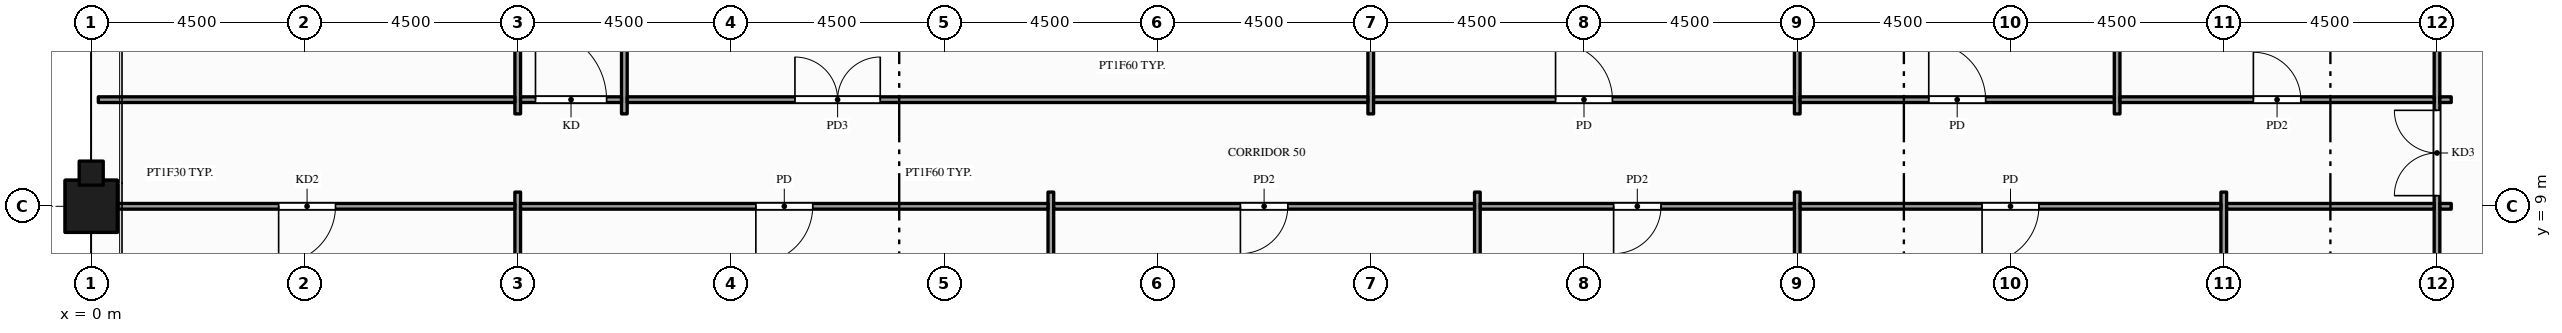
"""IFC4 building model, lengths in metres.
Left out: names, types, materials, properties, quantities, classifications, styles, units other than length and angle.
Written with IfcOpenShell. Run it as: python <this file> out.ifc"""

import sys

from ifc_helpers import new_model, si_unit, direction, frame, frame_2d, origin, origin_2d, place, context, subcontext, project, spatial, rectangle, hollow_rectangle, extrude, element, fill, save


model = new_model("IFC4")
c1 = context("Model", 3, precision=1e-05, world=origin(), true_north=direction((0.0, 1.0)))
c2 = subcontext(c1, "Body", "Model", "MODEL_VIEW")
j1 = project(units=[si_unit("LENGTHUNIT", "METRE"), si_unit("PLANEANGLEUNIT", "RADIAN")], contexts=[c1])
p1 = place(None, origin())
s1 = spatial("IfcSite", under=j1, at=p1, CompositionType="ELEMENT")
p2 = place(p1, origin())
s2 = spatial("IfcBuilding", under=s1, at=p2, CompositionType="ELEMENT")
p3 = place(p2, frame((0.0, 0.0, 77.0)))
s3 = spatial("IfcBuildingStorey", under=s2, at=p3, CompositionType="ELEMENT", Elevation=77.0)
p4 = place(p3, frame((0.0, 9.0, -0.25), z_axis=(0.0, 0.0, 1.0), x_axis=(1.0, 0.0, 0.0)))
e1 = element("IfcColumn", 1, at=p4, inside=s3, PredefinedType="COLUMN", context=c2, shape_type="SweptSolid", body=[
    extrude(hollow_rectangle(XDim=1.1, YDim=1.1, WallThickness=0.06, at=origin_2d()), origin(), (0.0, 0.0, 1.0), 4.6),
])
p5 = place(p3, frame((0.0, 9.0, 4.35), z_axis=(0.0, 0.0, 1.0), x_axis=(1.0, 0.0, 0.0)))
e2 = element("IfcColumn", 2, at=p5, inside=s3, PredefinedType="COLUMN", context=c2, shape_type="SweptSolid", body=[
    extrude(rectangle(XDim=1.1, YDim=1.1, at=origin_2d()), origin(), (0.0, 0.0, 1.0), 1.5),
])
p6 = place(p3, frame((9.0, 3.875, 0.0), z_axis=(0.0, 0.0, 1.0), x_axis=(0.0, 1.0, 0.0)))
e3 = element("IfcWall", 3, at=p6, inside=s3, PredefinedType="PARTITIONING", context=c2, shape_type="SweptSolid", body=[
    extrude(rectangle(XDim=5.425, YDim=0.12, at=frame_2d((2.712, 0.0))), origin(), (0.0, 0.0, 1.0), 4.938),
])
p7 = place(p3, frame((9.0, 10.95, 0.0), z_axis=(0.0, 0.0, 1.0), x_axis=(0.0, 1.0, 0.0)))
e4 = element("IfcWall", 4, at=p7, inside=s3, PredefinedType="PARTITIONING", context=c2, shape_type="SweptSolid", body=[
    extrude(rectangle(XDim=20.85, YDim=0.12, at=frame_2d((10.425, 0.0))), origin(), (0.0, 0.0, 1.0), 4.6),
])
p8 = place(p7, frame((2.05, 0.0, 0.0)))
e5 = element("IfcOpeningElement", 5, at=p8, cuts=e4, PredefinedType="OPENING", context=c2, shape_type="SweptSolid", body=[
    extrude(rectangle(XDim=1.0, YDim=2.1, at=frame_2d((0.5, 1.05))), frame((0.0, 0.07, 0.0), z_axis=(0.0, -1.0, 0.0), x_axis=(1.0, 0.0, 0.0)), (0.0, 0.0, 1.0), 0.14),
])
p9 = place(p7, frame((6.45, 0.0, 0.0)))
e6 = element("IfcOpeningElement", 6, at=p9, cuts=e4, PredefinedType="OPENING", context=c2, shape_type="SweptSolid", body=[
    extrude(rectangle(XDim=1.2, YDim=2.1, at=frame_2d((0.6, 1.05))), frame((0.0, 0.07, 0.0), z_axis=(0.0, -1.0, 0.0), x_axis=(1.0, 0.0, 0.0)), (0.0, 0.0, 1.0), 0.14),
])
p10 = place(p7, frame((12.175, 0.0, 0.0)))
e7 = element("IfcOpeningElement", 7, at=p10, cuts=e4, PredefinedType="OPENING", context=c2, shape_type="SweptSolid", body=[
    extrude(rectangle(XDim=1.0, YDim=2.1, at=frame_2d((0.5, 1.05))), frame((0.0, 0.07, 0.0), z_axis=(0.0, -1.0, 0.0), x_axis=(1.0, 0.0, 0.0)), (0.0, 0.0, 1.0), 0.14),
])
p11 = place(p3, frame((11.25, 10.95, 0.0), z_axis=(0.0, 0.0, 1.0), x_axis=(0.0, 1.0, 0.0)))
e8 = element("IfcWall", 8, at=p11, inside=s3, PredefinedType="PARTITIONING", context=c2, shape_type="SweptSolid", body=[
    extrude(rectangle(XDim=20.85, YDim=0.12, at=frame_2d((10.425, 0.0))), origin(), (0.0, 0.0, 1.0), 4.6),
])
p12 = place(p11, frame((17.8, 0.0, 0.0)))
e9 = element("IfcOpeningElement", 9, at=p12, cuts=e8, PredefinedType="OPENING", context=c2, shape_type="SweptSolid", body=[
    extrude(rectangle(XDim=1.0, YDim=2.1, at=frame_2d((0.5, 1.05))), frame((0.0, 0.07, 0.0), z_axis=(0.0, -1.0, 0.0), x_axis=(1.0, 0.0, 0.0)), (0.0, 0.0, 1.0), 0.14),
])
p13 = place(p11, frame((4.2, 0.0, 0.0)))
e10 = element("IfcOpeningElement", 10, at=p13, cuts=e8, PredefinedType="OPENING", context=c2, shape_type="SweptSolid", body=[
    extrude(rectangle(XDim=1.2, YDim=2.1, at=frame_2d((0.6, 1.05))), frame((0.0, 0.07, 0.0), z_axis=(0.0, -1.0, 0.0), x_axis=(1.0, 0.0, 0.0)), (0.0, 0.0, 1.0), 0.14),
])
p14 = place(p3, frame((20.25, 0.15, 0.0), z_axis=(0.0, 0.0, 1.0), x_axis=(0.0, 1.0, 0.0)))
e11 = element("IfcWall", 11, at=p14, inside=s3, PredefinedType="PARTITIONING", context=c2, shape_type="SweptSolid", body=[
    extrude(rectangle(XDim=9.15, YDim=0.12, at=frame_2d((4.575, 0.0))), origin(), (0.0, 0.0, 1.0), 4.938),
])
p15 = place(p3, frame((27.0, 10.95, 0.0), z_axis=(0.0, 0.0, 1.0), x_axis=(0.0, 1.0, 0.0)))
e12 = element("IfcWall", 12, at=p15, inside=s3, PredefinedType="PARTITIONING", context=c2, shape_type="SweptSolid", body=[
    extrude(rectangle(XDim=11.4, YDim=0.12, at=frame_2d((5.7, 0.0))), origin(), (0.0, 0.0, 1.0), 4.938),
])
for number, where, z_axis, x_axis in (
    (13, (29.25, 0.15, 0.0), (0.0, 0.0, 1.0), (0.0, 1.0, 0.0)),
    (14, (36.0, 0.15, 0.0), (0.0, 0.0, 1.0), (0.0, 1.0, 0.0)),
):
    element("IfcWall", number, at=place(p3, frame(where, z_axis=z_axis, x_axis=x_axis)), inside=s3, PredefinedType="PARTITIONING", context=c2, shape_type="SweptSolid", body=[
        extrude(rectangle(XDim=9.15, YDim=0.12, at=frame_2d((4.575, 0.0))), origin(), (0.0, 0.0, 1.0), 4.938),
    ])
p16 = place(p3, frame((36.0, 10.95, 0.0), z_axis=(0.0, 0.0, 1.0), x_axis=(0.0, 1.0, 0.0)))
e15 = element("IfcWall", 15, at=p16, inside=s3, PredefinedType="PARTITIONING", context=c2, shape_type="SweptSolid", body=[
    extrude(rectangle(XDim=11.4, YDim=0.12, at=frame_2d((5.7, 0.0))), origin(), (0.0, 0.0, 1.0), 4.45),
])
p17 = place(p3, frame((42.75, 10.95, 0.0), z_axis=(0.0, 0.0, 1.0), x_axis=(0.0, 1.0, 0.0)))
e16 = element("IfcWall", 16, at=p17, inside=s3, PredefinedType="PARTITIONING", context=c2, shape_type="SweptSolid", body=[
    extrude(rectangle(XDim=11.4, YDim=0.12, at=frame_2d((5.7, 0.0))), origin(), (0.0, 0.0, 1.0), 4.938),
])
p18 = place(p3, frame((45.0, 0.15, 0.0), z_axis=(0.0, 0.0, 1.0), x_axis=(0.0, 1.0, 0.0)))
e17 = element("IfcWall", 17, at=p18, inside=s3, PredefinedType="PARTITIONING", context=c2, shape_type="SweptSolid", body=[
    extrude(rectangle(XDim=9.15, YDim=0.12, at=frame_2d((4.575, 0.0))), origin(), (0.0, 0.0, 1.0), 4.938),
])
p19 = place(p3, frame((49.5, 0.15, 0.0), z_axis=(0.0, 0.0, 1.0), x_axis=(0.0, 1.0, 0.0)))
e18 = element("IfcWall", 18, at=p19, inside=s3, PredefinedType="PARTITIONING", context=c2, shape_type="SweptSolid", body=[
    extrude(rectangle(XDim=22.2, YDim=0.12, at=frame_2d((11.1, 0.0))), origin(), (0.0, 0.0, 1.0), 4.45),
])
p20 = place(p19, frame((9.075, 0.0, 0.0)))
e19 = element("IfcOpeningElement", 19, at=p20, cuts=e18, PredefinedType="OPENING", context=c2, shape_type="SweptSolid", body=[
    extrude(rectangle(XDim=1.8, YDim=2.1, at=frame_2d((0.9, 1.05))), frame((0.0, 0.07, 0.0), z_axis=(0.0, -1.0, 0.0), x_axis=(1.0, 0.0, 0.0)), (0.0, 0.0, 1.0), 0.14),
])
p21 = place(p19, frame((1.555, 0.0, 0.0)))
e20 = element("IfcOpeningElement", 20, at=p21, cuts=e18, PredefinedType="OPENING", context=c2, shape_type="SweptSolid", body=[
    extrude(rectangle(XDim=1.2, YDim=2.1, at=frame_2d((0.6, 1.05))), frame((0.0, 0.07, 0.0), z_axis=(0.0, -1.0, 0.0), x_axis=(1.0, 0.0, 0.0)), (0.0, 0.0, 1.0), 0.14),
])
p22 = place(p19, frame((6.0, 0.0, 0.0)))
e21 = element("IfcOpeningElement", 21, at=p22, cuts=e18, PredefinedType="OPENING", context=c2, shape_type="SweptSolid", body=[
    extrude(rectangle(XDim=1.2, YDim=2.1, at=frame_2d((0.6, 1.05))), frame((0.0, 0.07, 0.0), z_axis=(0.0, -1.0, 0.0), x_axis=(1.0, 0.0, 0.0)), (0.0, 0.0, 1.0), 0.14),
])
p23 = place(p3, frame((0.15, 9.0, 0.0), z_axis=(0.0, 0.0, 1.0), x_axis=(1.0, 0.0, 0.0)))
e22 = element("IfcWall", 22, at=p23, inside=s3, PredefinedType="PARTITIONING", context=c2, shape_type="SweptSolid", body=[
    extrude(rectangle(XDim=8.79, YDim=0.12, at=frame_2d((4.395, 0.0))), origin(), (0.0, 0.0, 1.0), 4.938),
])
p24 = place(p23, frame((3.805, 0.0, 0.0)))
e23 = element("IfcOpeningElement", 23, at=p24, cuts=e22, PredefinedType="OPENING", context=c2, shape_type="SweptSolid", body=[
    extrude(rectangle(XDim=1.2, YDim=2.1, at=frame_2d((0.6, 1.05))), frame((0.0, 0.07, 0.0), z_axis=(0.0, -1.0, 0.0), x_axis=(1.0, 0.0, 0.0)), (0.0, 0.0, 1.0), 0.14),
])
p25 = place(p3, frame((9.06, 9.0, 0.0), z_axis=(0.0, 0.0, 1.0), x_axis=(1.0, 0.0, 0.0)))
e24 = element("IfcWall", 24, at=p25, inside=s3, PredefinedType="PARTITIONING", context=c2, shape_type="SweptSolid", body=[
    extrude(rectangle(XDim=11.13, YDim=0.12, at=frame_2d((5.565, 0.0))), origin(), (0.0, 0.0, 1.0), 4.938),
])
p26 = place(p25, frame((4.965, 0.0, 0.0)))
e25 = element("IfcOpeningElement", 25, at=p26, cuts=e24, PredefinedType="OPENING", context=c2, shape_type="SweptSolid", body=[
    extrude(rectangle(XDim=1.2, YDim=2.1, at=frame_2d((0.6, 1.05))), frame((0.0, 0.07, 0.0), z_axis=(0.0, -1.0, 0.0), x_axis=(1.0, 0.0, 0.0)), (0.0, 0.0, 1.0), 0.14),
])
p27 = place(p3, frame((20.31, 9.0, 0.0), z_axis=(0.0, 0.0, 1.0), x_axis=(1.0, 0.0, 0.0)))
e26 = element("IfcWall", 26, at=p27, inside=s3, PredefinedType="PARTITIONING", context=c2, shape_type="SweptSolid", body=[
    extrude(rectangle(XDim=8.88, YDim=0.12, at=frame_2d((4.44, 0.0))), origin(), (0.0, 0.0, 1.0), 4.938),
])
p28 = place(p27, frame((3.94, 0.0, 0.0)))
e27 = element("IfcOpeningElement", 27, at=p28, cuts=e26, PredefinedType="OPENING", context=c2, shape_type="SweptSolid", body=[
    extrude(rectangle(XDim=1.0, YDim=2.1, at=frame_2d((0.5, 1.05))), frame((0.0, 0.07, 0.0), z_axis=(0.0, -1.0, 0.0), x_axis=(1.0, 0.0, 0.0)), (0.0, 0.0, 1.0), 0.14),
])
p29 = place(p3, frame((29.31, 9.0, 0.0), z_axis=(0.0, 0.0, 1.0), x_axis=(1.0, 0.0, 0.0)))
e28 = element("IfcWall", 28, at=p29, inside=s3, PredefinedType="PARTITIONING", context=c2, shape_type="SweptSolid", body=[
    extrude(rectangle(XDim=6.63, YDim=0.12, at=frame_2d((3.315, 0.0))), origin(), (0.0, 0.0, 1.0), 4.938),
])
p30 = place(p29, frame((2.815, 0.0, 0.0)))
e29 = element("IfcOpeningElement", 29, at=p30, cuts=e28, PredefinedType="OPENING", context=c2, shape_type="SweptSolid", body=[
    extrude(rectangle(XDim=1.0, YDim=2.1, at=frame_2d((0.5, 1.05))), frame((0.0, 0.07, 0.0), z_axis=(0.0, -1.0, 0.0), x_axis=(1.0, 0.0, 0.0)), (0.0, 0.0, 1.0), 0.14),
])
p31 = place(p3, frame((36.06, 9.0, 0.0), z_axis=(0.0, 0.0, 1.0), x_axis=(1.0, 0.0, 0.0)))
e30 = element("IfcWall", 30, at=p31, inside=s3, PredefinedType="PARTITIONING", context=c2, shape_type="SweptSolid", body=[
    extrude(rectangle(XDim=8.88, YDim=0.12, at=frame_2d((4.44, 0.0))), origin(), (0.0, 0.0, 1.0), 4.938),
])
p32 = place(p31, frame((3.84, 0.0, 0.0)))
e31 = element("IfcOpeningElement", 31, at=p32, cuts=e30, PredefinedType="OPENING", context=c2, shape_type="SweptSolid", body=[
    extrude(rectangle(XDim=1.2, YDim=2.1, at=frame_2d((0.6, 1.05))), frame((0.0, 0.07, 0.0), z_axis=(0.0, -1.0, 0.0), x_axis=(1.0, 0.0, 0.0)), (0.0, 0.0, 1.0), 0.14),
])
p33 = place(p3, frame((45.06, 9.0, 0.0), z_axis=(0.0, 0.0, 1.0), x_axis=(1.0, 0.0, 0.0)))
e32 = element("IfcWall", 32, at=p33, inside=s3, PredefinedType="PARTITIONING", context=c2, shape_type="SweptSolid", body=[
    extrude(rectangle(XDim=4.38, YDim=0.12, at=frame_2d((2.19, 0.0))), origin(), (0.0, 0.0, 1.0), 4.938),
])
p34 = place(p3, frame((49.56, 9.0, 0.0), z_axis=(0.0, 0.0, 1.0), x_axis=(1.0, 0.0, 0.0)))
e33 = element("IfcWall", 33, at=p34, inside=s3, PredefinedType="PARTITIONING", context=c2, shape_type="SweptSolid", body=[
    extrude(rectangle(XDim=0.24, YDim=0.12, at=frame_2d((0.12, 0.0))), origin(), (0.0, 0.0, 1.0), 4.938),
])
p35 = place(p3, frame((0.15, 11.25, 0.0), z_axis=(0.0, 0.0, 1.0), x_axis=(1.0, 0.0, 0.0)))
e34 = element("IfcWall", 34, at=p35, inside=s3, PredefinedType="PARTITIONING", context=c2, shape_type="SweptSolid", body=[
    extrude(rectangle(XDim=8.79, YDim=0.12, at=frame_2d((4.395, 0.0))), origin(), (0.0, 0.0, 1.0), 4.938),
])
p36 = place(p3, frame((9.06, 11.25, 0.0), z_axis=(0.0, 0.0, 1.0), x_axis=(1.0, 0.0, 0.0)))
e35 = element("IfcWall", 35, at=p36, inside=s3, PredefinedType="PARTITIONING", context=c2, shape_type="SweptSolid", body=[
    extrude(rectangle(XDim=2.13, YDim=0.12, at=frame_2d((1.065, 0.0))), origin(), (0.0, 0.0, 1.0), 4.938),
])
p37 = place(p36, frame((0.315, 0.0, 0.0)))
e36 = element("IfcOpeningElement", 36, at=p37, cuts=e35, PredefinedType="OPENING", context=c2, shape_type="SweptSolid", body=[
    extrude(rectangle(XDim=1.5, YDim=2.1, at=frame_2d((0.75, 1.05))), frame((0.0, 0.07, 0.0), z_axis=(0.0, -1.0, 0.0), x_axis=(1.0, 0.0, 0.0)), (0.0, 0.0, 1.0), 0.14),
])
p38 = place(p3, frame((11.31, 11.25, 0.0), z_axis=(0.0, 0.0, 1.0), x_axis=(1.0, 0.0, 0.0)))
e37 = element("IfcWall", 37, at=p38, inside=s3, PredefinedType="PARTITIONING", context=c2, shape_type="SweptSolid", body=[
    extrude(rectangle(XDim=15.63, YDim=0.12, at=frame_2d((7.815, 0.0))), origin(), (0.0, 0.0, 1.0), 4.938),
])
p39 = place(p38, frame((3.54, 0.0, 0.0)))
e38 = element("IfcOpeningElement", 38, at=p39, cuts=e37, PredefinedType="OPENING", context=c2, shape_type="SweptSolid", body=[
    extrude(rectangle(XDim=1.8, YDim=2.1, at=frame_2d((0.9, 1.05))), frame((0.0, 0.07, 0.0), z_axis=(0.0, -1.0, 0.0), x_axis=(1.0, 0.0, 0.0)), (0.0, 0.0, 1.0), 0.14),
])
p40 = place(p3, frame((27.06, 11.25, 0.0), z_axis=(0.0, 0.0, 1.0), x_axis=(1.0, 0.0, 0.0)))
e39 = element("IfcWall", 39, at=p40, inside=s3, PredefinedType="PARTITIONING", context=c2, shape_type="SweptSolid", body=[
    extrude(rectangle(XDim=8.88, YDim=0.12, at=frame_2d((4.44, 0.0))), origin(), (0.0, 0.0, 1.0), 4.938),
])
p41 = place(p40, frame((3.84, 0.0, 0.0)))
e40 = element("IfcOpeningElement", 40, at=p41, cuts=e39, PredefinedType="OPENING", context=c2, shape_type="SweptSolid", body=[
    extrude(rectangle(XDim=1.2, YDim=2.1, at=frame_2d((0.6, 1.05))), frame((0.0, 0.07, 0.0), z_axis=(0.0, -1.0, 0.0), x_axis=(1.0, 0.0, 0.0)), (0.0, 0.0, 1.0), 0.14),
])
p42 = place(p3, frame((36.06, 11.25, 0.0), z_axis=(0.0, 0.0, 1.0), x_axis=(1.0, 0.0, 0.0)))
e41 = element("IfcWall", 41, at=p42, inside=s3, PredefinedType="PARTITIONING", context=c2, shape_type="SweptSolid", body=[
    extrude(rectangle(XDim=6.63, YDim=0.12, at=frame_2d((3.315, 0.0))), origin(), (0.0, 0.0, 1.0), 4.938),
])
p43 = place(p42, frame((2.715, 0.0, 0.0)))
e42 = element("IfcOpeningElement", 42, at=p43, cuts=e41, PredefinedType="OPENING", context=c2, shape_type="SweptSolid", body=[
    extrude(rectangle(XDim=1.2, YDim=2.1, at=frame_2d((0.6, 1.05))), frame((0.0, 0.07, 0.0), z_axis=(0.0, -1.0, 0.0), x_axis=(1.0, 0.0, 0.0)), (0.0, 0.0, 1.0), 0.14),
])
p44 = place(p3, frame((42.81, 11.25, 0.0), z_axis=(0.0, 0.0, 1.0), x_axis=(1.0, 0.0, 0.0)))
e43 = element("IfcWall", 43, at=p44, inside=s3, PredefinedType="PARTITIONING", context=c2, shape_type="SweptSolid", body=[
    extrude(rectangle(XDim=6.63, YDim=0.12, at=frame_2d((3.315, 0.0))), origin(), (0.0, 0.0, 1.0), 4.938),
])
p45 = place(p44, frame((2.815, 0.0, 0.0)))
e44 = element("IfcOpeningElement", 44, at=p45, cuts=e43, PredefinedType="OPENING", context=c2, shape_type="SweptSolid", body=[
    extrude(rectangle(XDim=1.0, YDim=2.1, at=frame_2d((0.5, 1.05))), frame((0.0, 0.07, 0.0), z_axis=(0.0, -1.0, 0.0), x_axis=(1.0, 0.0, 0.0)), (0.0, 0.0, 1.0), 0.14),
])
p46 = place(p3, frame((49.56, 11.25, 0.0), z_axis=(0.0, 0.0, 1.0), x_axis=(1.0, 0.0, 0.0)))
e45 = element("IfcWall", 45, at=p46, inside=s3, PredefinedType="PARTITIONING", context=c2, shape_type="SweptSolid", body=[
    extrude(rectangle(XDim=0.24, YDim=0.12, at=frame_2d((0.12, 0.0))), origin(), (0.0, 0.0, 1.0), 4.938),
])
p47 = place(p20, origin())
e46 = element("IfcDoor", 46, at=p47, inside=s3, OperationType="DOUBLE_DOOR_SINGLE_SWING", PredefinedType="DOOR", context=c2, shape_type="SweptSolid", body=[
    extrude(rectangle(XDim=1.8, YDim=2.1, at=frame_2d((0.9, 1.05))), frame((0.0, 0.025, 0.0), z_axis=(0.0, -1.0, 0.0), x_axis=(1.0, 0.0, 0.0)), (0.0, 0.0, 1.0), 0.05),
])
fill(e19, e46)
p48 = place(p24, origin())
e47 = element("IfcDoor", 47, at=p48, inside=s3, OperationType="SINGLE_SWING_LEFT", PredefinedType="DOOR", context=c2, shape_type="SweptSolid", body=[
    extrude(rectangle(XDim=1.2, YDim=2.1, at=frame_2d((0.6, 1.05))), frame((0.0, 0.025, 0.0), z_axis=(0.0, -1.0, 0.0), x_axis=(1.0, 0.0, 0.0)), (0.0, 0.0, 1.0), 0.05),
])
fill(e23, e47)
p49 = place(p26, origin())
e48 = element("IfcDoor", 48, at=p49, inside=s3, OperationType="SINGLE_SWING_LEFT", PredefinedType="DOOR", context=c2, shape_type="SweptSolid", body=[
    extrude(rectangle(XDim=1.2, YDim=2.1, at=frame_2d((0.6, 1.05))), frame((0.0, 0.025, 0.0), z_axis=(0.0, -1.0, 0.0), x_axis=(1.0, 0.0, 0.0)), (0.0, 0.0, 1.0), 0.05),
])
fill(e25, e48)
p50 = place(p28, origin())
e49 = element("IfcDoor", 49, at=p50, inside=s3, OperationType="SINGLE_SWING_LEFT", PredefinedType="DOOR", context=c2, shape_type="SweptSolid", body=[
    extrude(rectangle(XDim=1.0, YDim=2.1, at=frame_2d((0.5, 1.05))), frame((0.0, 0.025, 0.0), z_axis=(0.0, -1.0, 0.0), x_axis=(1.0, 0.0, 0.0)), (0.0, 0.0, 1.0), 0.05),
])
fill(e27, e49)
p51 = place(p30, origin())
e50 = element("IfcDoor", 50, at=p51, inside=s3, OperationType="SINGLE_SWING_LEFT", PredefinedType="DOOR", context=c2, shape_type="SweptSolid", body=[
    extrude(rectangle(XDim=1.0, YDim=2.1, at=frame_2d((0.5, 1.05))), frame((0.0, 0.025, 0.0), z_axis=(0.0, -1.0, 0.0), x_axis=(1.0, 0.0, 0.0)), (0.0, 0.0, 1.0), 0.05),
])
fill(e29, e50)
p52 = place(p32, origin())
e51 = element("IfcDoor", 51, at=p52, inside=s3, OperationType="SINGLE_SWING_LEFT", PredefinedType="DOOR", context=c2, shape_type="SweptSolid", body=[
    extrude(rectangle(XDim=1.2, YDim=2.1, at=frame_2d((0.6, 1.05))), frame((0.0, 0.025, 0.0), z_axis=(0.0, -1.0, 0.0), x_axis=(1.0, 0.0, 0.0)), (0.0, 0.0, 1.0), 0.05),
])
fill(e31, e51)
p53 = place(p41, origin())
e52 = element("IfcDoor", 52, at=p53, inside=s3, OperationType="SINGLE_SWING_LEFT", PredefinedType="DOOR", context=c2, shape_type="SweptSolid", body=[
    extrude(rectangle(XDim=1.2, YDim=2.1, at=frame_2d((0.6, 1.05))), frame((0.0, 0.025, 0.0), z_axis=(0.0, -1.0, 0.0), x_axis=(1.0, 0.0, 0.0)), (0.0, 0.0, 1.0), 0.05),
])
fill(e40, e52)
p54 = place(p43, origin())
e53 = element("IfcDoor", 53, at=p54, inside=s3, OperationType="SINGLE_SWING_LEFT", PredefinedType="DOOR", context=c2, shape_type="SweptSolid", body=[
    extrude(rectangle(XDim=1.2, YDim=2.1, at=frame_2d((0.6, 1.05))), frame((0.0, 0.025, 0.0), z_axis=(0.0, -1.0, 0.0), x_axis=(1.0, 0.0, 0.0)), (0.0, 0.0, 1.0), 0.05),
])
fill(e42, e53)
p55 = place(p45, origin())
e54 = element("IfcDoor", 54, at=p55, inside=s3, OperationType="SINGLE_SWING_LEFT", PredefinedType="DOOR", context=c2, shape_type="SweptSolid", body=[
    extrude(rectangle(XDim=1.0, YDim=2.1, at=frame_2d((0.5, 1.05))), frame((0.0, 0.025, 0.0), z_axis=(0.0, -1.0, 0.0), x_axis=(1.0, 0.0, 0.0)), (0.0, 0.0, 1.0), 0.05),
])
fill(e44, e54)
p56 = place(p39, origin())
e55 = element("IfcDoor", 55, at=p56, inside=s3, OperationType="DOUBLE_DOOR_SINGLE_SWING", PredefinedType="DOOR", context=c2, shape_type="SweptSolid", body=[
    extrude(rectangle(XDim=1.8, YDim=2.1, at=frame_2d((0.9, 1.05))), frame((0.0, 0.025, 0.0), z_axis=(0.0, -1.0, 0.0), x_axis=(1.0, 0.0, 0.0)), (0.0, 0.0, 1.0), 0.05),
])
fill(e38, e55)
p57 = place(p37, origin())
e56 = element("IfcDoor", 56, at=p57, inside=s3, OperationType="SINGLE_SWING_LEFT", PredefinedType="DOOR", context=c2, shape_type="SweptSolid", body=[
    extrude(rectangle(XDim=1.5, YDim=2.1, at=frame_2d((0.75, 1.05))), frame((0.0, 0.025, 0.0), z_axis=(0.0, -1.0, 0.0), x_axis=(1.0, 0.0, 0.0)), (0.0, 0.0, 1.0), 0.05),
])
fill(e36, e56)
save(model, sys.argv[1])
